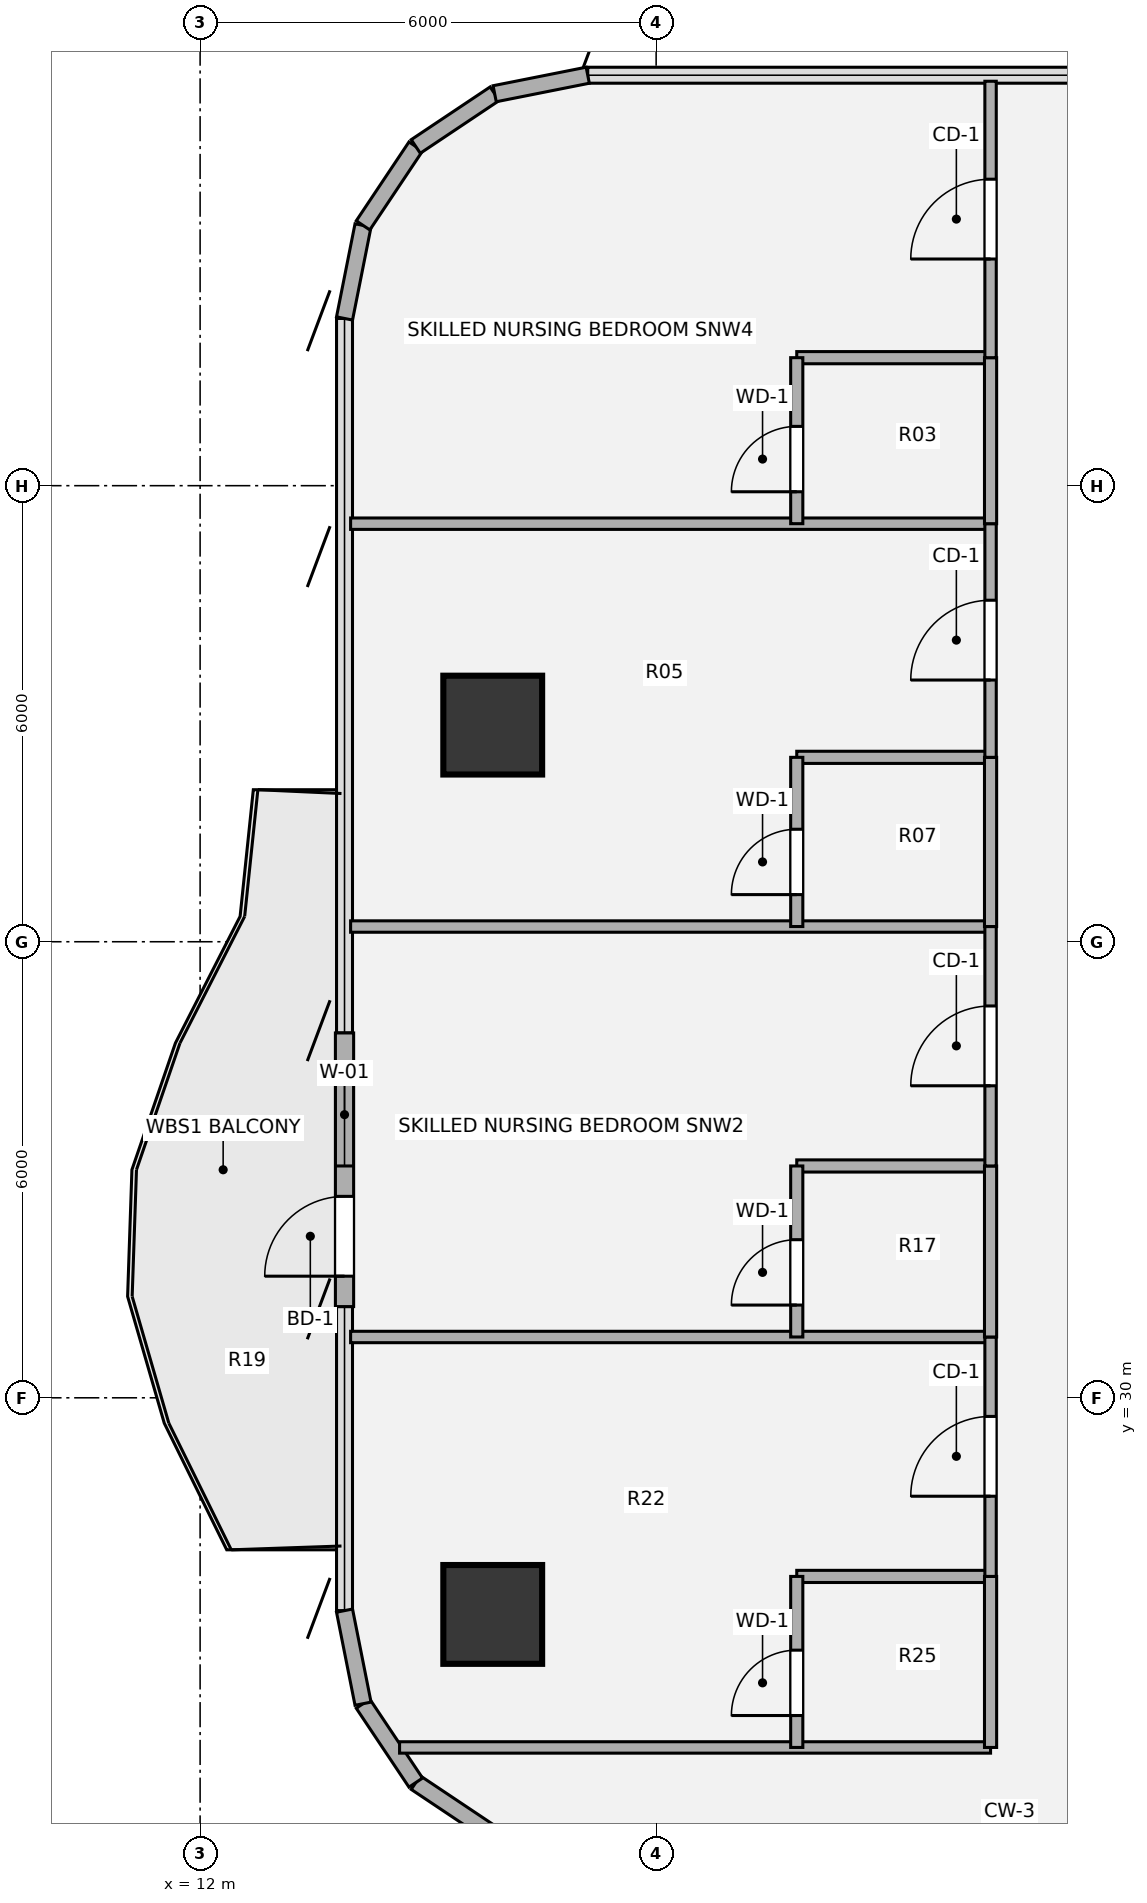
"""IFC4 building model, lengths in metres.
Left out: names, types, materials, properties, quantities, classifications, styles, units other than length and angle.
Written with IfcOpenShell. Run it as: python <this file> out.ifc"""

import sys

from ifc_helpers import new_model, si_unit, direction, frame, frame_2d, origin, origin_2d, place, context, subcontext, project, spatial, rectangle, hollow_circle, extrude, source, transform, mapped, element, fill, save


model = new_model("IFC4")
c1 = context("Model", 3, precision=1e-05, world=origin(), true_north=direction((0.0, 1.0)))
c2 = subcontext(c1, "Body", "Model", "MODEL_VIEW")
j1 = project(units=[si_unit("LENGTHUNIT", "METRE"), si_unit("PLANEANGLEUNIT", "RADIAN")], contexts=[c1])
p1 = place(None, origin())
s1 = spatial("IfcSite", under=j1, at=p1, CompositionType="ELEMENT")
p2 = place(p1, origin())
s2 = spatial("IfcBuilding", under=s1, at=p2, CompositionType="ELEMENT")
p3 = place(p2, frame((0.0, 0.0, 127.62)))
s3 = spatial("IfcBuildingStorey", under=s2, at=p3, CompositionType="ELEMENT", Elevation=127.62)
m1 = source(origin(), c2, "Body", "SweptSolid", [
    extrude(hollow_circle(Radius=0.65, WallThickness=0.045, at=origin_2d()), origin(), (0.0, 0.0, 1.0), 3.78),
])
for number, where, z_axis, x_axis in (
    (1, (15.85, 27.15, 0.0), (0.0, 0.0, 1.0), (1.0, 0.0, 0.0)),
    (2, (15.85, 38.85, 0.0), (0.0, 0.0, 1.0), (1.0, 0.0, 0.0)),
):
    element("IfcColumn", number, at=place(p3, frame(where, z_axis=z_axis, x_axis=x_axis)), inside=s3, PredefinedType="COLUMN", context=c2, shape_type="MappedRepresentation", body=[
        mapped(m1, transform((0.0, 0.0, 0.0), x_axis=(1.0, 0.0, 0.0), y_axis=(0.0, 1.0, 0.0), z_axis=(0.0, 0.0, 1.0), scale=1.0)),
    ])
for number, where, z_axis, x_axis in (
    (3, (15.875, 24.244, 0.0), (0.0, 0.0, 1.0), (-0.831, 0.556, 0.0)),
    (4, (14.837, 24.937, 0.0), (0.0, 0.0, 1.0), (-0.556, 0.831, 0.0)),
    (5, (14.144, 25.975, 0.0), (0.0, 0.0, 1.0), (-0.195, 0.981, 0.0)),
):
    element("IfcWall", number, at=place(p3, frame(where, z_axis=z_axis, x_axis=x_axis)), inside=s3, PredefinedType="SOLIDWALL", context=c2, shape_type="SweptSolid", body=[
        extrude(rectangle(XDim=1.249, YDim=0.215, at=frame_2d((0.624, 0.0))), origin(), (0.0, 0.0, 1.0), 3.53),
    ])
p4 = place(p3, frame((13.9, 31.2, 0.0), z_axis=(0.0, 0.0, 1.0), x_axis=(0.0, 1.0, 0.0)))
e6 = element("IfcWall", 6, at=p4, inside=s3, PredefinedType="SOLIDWALL", context=c2, shape_type="SweptSolid", body=[
    extrude(rectangle(XDim=3.6, YDim=0.24, at=frame_2d((1.8, 0.0))), origin(), (0.0, 0.0, 1.0), 3.53),
])
p5 = place(p4, frame((0.4, 0.0, 0.0)))
e7 = element("IfcOpeningElement", 7, at=p5, cuts=e6, PredefinedType="OPENING", context=c2, shape_type="SweptSolid", body=[
    extrude(rectangle(XDim=1.05, YDim=2.15, at=origin_2d()), frame((0.525, 0.13, 1.075), z_axis=(0.0, -1.0, 0.0), x_axis=(1.0, 0.0, 0.0)), (0.0, 0.0, 1.0), 0.26),
])
p6 = place(p4, frame((1.85, 0.0, 0.85)))
e8 = element("IfcOpeningElement", 8, at=p6, cuts=e6, PredefinedType="OPENING", context=c2, shape_type="SweptSolid", body=[
    extrude(rectangle(XDim=1.35, YDim=1.35, at=origin_2d()), frame((0.675, 0.13, 0.675), z_axis=(0.0, -1.0, 0.0), x_axis=(1.0, 0.0, 0.0)), (0.0, 0.0, 1.0), 0.26),
])
for number, where, z_axis, x_axis in (
    (9, (13.9, 44.2, 0.0), (0.0, 0.0, 1.0), (0.195, 0.981, 0.0)),
    (10, (14.144, 45.425, 0.0), (0.0, 0.0, 1.0), (0.556, 0.831, 0.0)),
    (11, (14.837, 46.463, 0.0), (0.0, 0.0, 1.0), (0.831, 0.556, 0.0)),
    (12, (15.875, 47.156, 0.0), (0.0, 0.0, 1.0), (0.981, 0.195, 0.0)),
):
    element("IfcWall", number, at=place(p3, frame(where, z_axis=z_axis, x_axis=x_axis)), inside=s3, PredefinedType="SOLIDWALL", context=c2, shape_type="SweptSolid", body=[
        extrude(rectangle(XDim=1.249, YDim=0.215, at=frame_2d((0.624, 0.0))), origin(), (0.0, 0.0, 1.0), 3.53),
    ])
p7 = place(p3, frame((14.624, 25.4, 0.0), z_axis=(0.0, 0.0, 1.0), x_axis=(1.0, 0.0, 0.0)))
e13 = element("IfcWall", 13, at=p7, inside=s3, PredefinedType="PARTITIONING", context=c2, shape_type="SweptSolid", body=[
    extrude(rectangle(XDim=7.776, YDim=0.15, at=frame_2d((3.888, 0.0))), origin(), (0.0, 0.0, 1.0), 3.5),
])
p8 = place(p3, frame((19.85, 27.65, 0.0), z_axis=(0.0, 0.0, 1.0), x_axis=(1.0, 0.0, 0.0)))
e14 = element("IfcWall", 14, at=p8, inside=s3, PredefinedType="PLUMBINGWALL", context=c2, shape_type="SweptSolid", body=[
    extrude(rectangle(XDim=2.55, YDim=0.16, at=frame_2d((1.275, 0.0))), origin(), (0.0, 0.0, 1.0), 2.982),
])
p9 = place(p3, frame((13.98, 30.8, 0.0), z_axis=(0.0, 0.0, 1.0), x_axis=(1.0, 0.0, 0.0)))
e15 = element("IfcWall", 15, at=p9, inside=s3, PredefinedType="PARTITIONING", context=c2, shape_type="SweptSolid", body=[
    extrude(rectangle(XDim=8.42, YDim=0.15, at=frame_2d((4.21, 0.0))), origin(), (0.0, 0.0, 1.0), 2.982),
])
p10 = place(p3, frame((19.85, 33.05, 0.0), z_axis=(0.0, 0.0, 1.0), x_axis=(1.0, 0.0, 0.0)))
e16 = element("IfcWall", 16, at=p10, inside=s3, PredefinedType="PLUMBINGWALL", context=c2, shape_type="SweptSolid", body=[
    extrude(rectangle(XDim=2.55, YDim=0.16, at=frame_2d((1.275, 0.0))), origin(), (0.0, 0.0, 1.0), 2.982),
])
p11 = place(p3, frame((13.98, 36.2, 0.0), z_axis=(0.0, 0.0, 1.0), x_axis=(1.0, 0.0, 0.0)))
e17 = element("IfcWall", 17, at=p11, inside=s3, PredefinedType="PARTITIONING", context=c2, shape_type="SweptSolid", body=[
    extrude(rectangle(XDim=8.42, YDim=0.15, at=frame_2d((4.21, 0.0))), origin(), (0.0, 0.0, 1.0), 2.982),
])
p12 = place(p3, frame((19.85, 38.426, 0.0), z_axis=(0.0, 0.0, 1.0), x_axis=(1.0, 0.0, 0.0)))
e18 = element("IfcWall", 18, at=p12, inside=s3, PredefinedType="PLUMBINGWALL", context=c2, shape_type="SweptSolid", body=[
    extrude(rectangle(XDim=2.55, YDim=0.16, at=frame_2d((1.275, 0.0))), origin(), (0.0, 0.0, 1.0), 3.055),
])
p13 = place(p3, frame((13.98, 41.5, 0.0), z_axis=(0.0, 0.0, 1.0), x_axis=(1.0, 0.0, 0.0)))
e19 = element("IfcWall", 19, at=p13, inside=s3, PredefinedType="PARTITIONING", context=c2, shape_type="SweptSolid", body=[
    extrude(rectangle(XDim=8.42, YDim=0.15, at=frame_2d((4.21, 0.0))), origin(), (0.0, 0.0, 1.0), 3.5),
])
p14 = place(p3, frame((19.85, 43.684, 0.0), z_axis=(0.0, 0.0, 1.0), x_axis=(1.0, 0.0, 0.0)))
e20 = element("IfcWall", 20, at=p14, inside=s3, PredefinedType="PLUMBINGWALL", context=c2, shape_type="SweptSolid", body=[
    extrude(rectangle(XDim=2.55, YDim=0.16, at=frame_2d((1.275, 0.0))), origin(), (0.0, 0.0, 1.0), 3.5),
])
p15 = place(p3, frame((19.85, 25.4, 0.0), z_axis=(0.0, 0.0, 1.0), x_axis=(0.0, 1.0, 0.0)))
e21 = element("IfcWall", 21, at=p15, inside=s3, PredefinedType="PLUMBINGWALL", context=c2, shape_type="SweptSolid", body=[
    extrude(rectangle(XDim=2.25, YDim=0.16, at=frame_2d((1.125, 0.0))), origin(), (0.0, 0.0, 1.0), 3.5),
])
p16 = place(p15, frame((0.42, 0.0, 0.0)))
e22 = element("IfcOpeningElement", 22, at=p16, cuts=e21, PredefinedType="OPENING", context=c2, shape_type="SweptSolid", body=[
    extrude(rectangle(XDim=0.86, YDim=2.1, at=origin_2d()), frame((0.43, 0.09, 1.05), z_axis=(0.0, -1.0, 0.0), x_axis=(1.0, 0.0, 0.0)), (0.0, 0.0, 1.0), 0.18),
])
p17 = place(p3, frame((19.85, 30.8, 0.0), z_axis=(0.0, 0.0, 1.0), x_axis=(0.0, 1.0, 0.0)))
e23 = element("IfcWall", 23, at=p17, inside=s3, PredefinedType="PLUMBINGWALL", context=c2, shape_type="SweptSolid", body=[
    extrude(rectangle(XDim=2.25, YDim=0.16, at=frame_2d((1.125, 0.0))), origin(), (0.0, 0.0, 1.0), 3.5),
])
p18 = place(p17, frame((0.42, 0.0, 0.0)))
e24 = element("IfcOpeningElement", 24, at=p18, cuts=e23, PredefinedType="OPENING", context=c2, shape_type="SweptSolid", body=[
    extrude(rectangle(XDim=0.86, YDim=2.1, at=origin_2d()), frame((0.43, 0.09, 1.05), z_axis=(0.0, -1.0, 0.0), x_axis=(1.0, 0.0, 0.0)), (0.0, 0.0, 1.0), 0.18),
])
p19 = place(p3, frame((19.85, 36.2, 0.0), z_axis=(0.0, 0.0, 1.0), x_axis=(0.0, 1.0, 0.0)))
e25 = element("IfcWall", 25, at=p19, inside=s3, PredefinedType="PLUMBINGWALL", context=c2, shape_type="SweptSolid", body=[
    extrude(rectangle(XDim=2.226, YDim=0.16, at=frame_2d((1.113, 0.0))), origin(), (0.0, 0.0, 1.0), 3.5),
])
p20 = place(p19, frame((0.42, 0.0, 0.0)))
e26 = element("IfcOpeningElement", 26, at=p20, cuts=e25, PredefinedType="OPENING", context=c2, shape_type="SweptSolid", body=[
    extrude(rectangle(XDim=0.86, YDim=2.1, at=origin_2d()), frame((0.43, 0.09, 1.05), z_axis=(0.0, -1.0, 0.0), x_axis=(1.0, 0.0, 0.0)), (0.0, 0.0, 1.0), 0.18),
])
p21 = place(p3, frame((19.85, 41.5, 0.0), z_axis=(0.0, 0.0, 1.0), x_axis=(0.0, 1.0, 0.0)))
e27 = element("IfcWall", 27, at=p21, inside=s3, PredefinedType="PLUMBINGWALL", context=c2, shape_type="SweptSolid", body=[
    extrude(rectangle(XDim=2.184, YDim=0.16, at=frame_2d((1.092, 0.0))), origin(), (0.0, 0.0, 1.0), 3.5),
])
p22 = place(p21, frame((0.42, 0.0, 0.0)))
e28 = element("IfcOpeningElement", 28, at=p22, cuts=e27, PredefinedType="OPENING", context=c2, shape_type="SweptSolid", body=[
    extrude(rectangle(XDim=0.86, YDim=2.1, at=origin_2d()), frame((0.43, 0.09, 1.05), z_axis=(0.0, -1.0, 0.0), x_axis=(1.0, 0.0, 0.0)), (0.0, 0.0, 1.0), 0.18),
])
p23 = place(p3, frame((22.4, 25.4, 0.0), z_axis=(0.0, 0.0, 1.0), x_axis=(0.0, 1.0, 0.0)))
e29 = element("IfcWall", 29, at=p23, inside=s3, PredefinedType="PLUMBINGWALL", context=c2, shape_type="SweptSolid", body=[
    extrude(rectangle(XDim=2.25, YDim=0.16, at=frame_2d((1.125, 0.0))), origin(), (0.0, 0.0, 1.0), 3.5),
])
p24 = place(p3, frame((22.4, 27.65, 0.0), z_axis=(0.0, 0.0, 1.0), x_axis=(0.0, 1.0, 0.0)))
e30 = element("IfcWall", 30, at=p24, inside=s3, PredefinedType="PARTITIONING", context=c2, shape_type="SweptSolid", body=[
    extrude(rectangle(XDim=3.15, YDim=0.15, at=frame_2d((1.575, 0.0))), origin(), (0.0, 0.0, 1.0), 3.5),
])
p25 = place(p24, frame((1.055, 0.0, 0.0)))
e31 = element("IfcOpeningElement", 31, at=p25, cuts=e30, PredefinedType="OPENING", context=c2, shape_type="SweptSolid", body=[
    extrude(rectangle(XDim=1.05, YDim=2.1, at=origin_2d()), frame((0.525, 0.085, 1.05), z_axis=(0.0, -1.0, 0.0), x_axis=(1.0, 0.0, 0.0)), (0.0, 0.0, 1.0), 0.17),
])
p26 = place(p3, frame((22.4, 30.8, 0.0), z_axis=(0.0, 0.0, 1.0), x_axis=(0.0, 1.0, 0.0)))
e32 = element("IfcWall", 32, at=p26, inside=s3, PredefinedType="PLUMBINGWALL", context=c2, shape_type="SweptSolid", body=[
    extrude(rectangle(XDim=2.25, YDim=0.16, at=frame_2d((1.125, 0.0))), origin(), (0.0, 0.0, 1.0), 3.5),
])
p27 = place(p3, frame((22.4, 33.05, 0.0), z_axis=(0.0, 0.0, 1.0), x_axis=(0.0, 1.0, 0.0)))
e33 = element("IfcWall", 33, at=p27, inside=s3, PredefinedType="PARTITIONING", context=c2, shape_type="SweptSolid", body=[
    extrude(rectangle(XDim=3.15, YDim=0.15, at=frame_2d((1.575, 0.0))), origin(), (0.0, 0.0, 1.0), 3.5),
])
p28 = place(p27, frame((1.055, 0.0, 0.0)))
e34 = element("IfcOpeningElement", 34, at=p28, cuts=e33, PredefinedType="OPENING", context=c2, shape_type="SweptSolid", body=[
    extrude(rectangle(XDim=1.05, YDim=2.1, at=origin_2d()), frame((0.525, 0.085, 1.05), z_axis=(0.0, -1.0, 0.0), x_axis=(1.0, 0.0, 0.0)), (0.0, 0.0, 1.0), 0.17),
])
p29 = place(p3, frame((22.4, 36.2, 0.0), z_axis=(0.0, 0.0, 1.0), x_axis=(0.0, 1.0, 0.0)))
e35 = element("IfcWall", 35, at=p29, inside=s3, PredefinedType="PLUMBINGWALL", context=c2, shape_type="SweptSolid", body=[
    extrude(rectangle(XDim=2.226, YDim=0.16, at=frame_2d((1.113, 0.0))), origin(), (0.0, 0.0, 1.0), 3.5),
])
p30 = place(p3, frame((22.4, 38.426, 0.0), z_axis=(0.0, 0.0, 1.0), x_axis=(0.0, 1.0, 0.0)))
e36 = element("IfcWall", 36, at=p30, inside=s3, PredefinedType="PARTITIONING", context=c2, shape_type="SweptSolid", body=[
    extrude(rectangle(XDim=3.074, YDim=0.15, at=frame_2d((1.537, 0.0))), origin(), (0.0, 0.0, 1.0), 3.5),
])
p31 = place(p30, frame((1.017, 0.0, 0.0)))
e37 = element("IfcOpeningElement", 37, at=p31, cuts=e36, PredefinedType="OPENING", context=c2, shape_type="SweptSolid", body=[
    extrude(rectangle(XDim=1.05, YDim=2.1, at=origin_2d()), frame((0.525, 0.085, 1.05), z_axis=(0.0, -1.0, 0.0), x_axis=(1.0, 0.0, 0.0)), (0.0, 0.0, 1.0), 0.17),
])
p32 = place(p3, frame((22.4, 41.5, 0.0), z_axis=(0.0, 0.0, 1.0), x_axis=(0.0, 1.0, 0.0)))
e38 = element("IfcWall", 38, at=p32, inside=s3, PredefinedType="PLUMBINGWALL", context=c2, shape_type="SweptSolid", body=[
    extrude(rectangle(XDim=2.184, YDim=0.16, at=frame_2d((1.092, 0.0))), origin(), (0.0, 0.0, 1.0), 3.5),
])
p33 = place(p3, frame((22.4, 43.684, 0.0), z_axis=(0.0, 0.0, 1.0), x_axis=(0.0, 1.0, 0.0)))
e39 = element("IfcWall", 39, at=p33, inside=s3, PredefinedType="PARTITIONING", context=c2, shape_type="SweptSolid", body=[
    extrude(rectangle(XDim=3.637, YDim=0.15, at=frame_2d((1.818, 0.0))), origin(), (0.0, 0.0, 1.0), 3.5),
])
p34 = place(p33, frame((1.298, 0.0, 0.0)))
e40 = element("IfcOpeningElement", 40, at=p34, cuts=e39, PredefinedType="OPENING", context=c2, shape_type="SweptSolid", body=[
    extrude(rectangle(XDim=1.05, YDim=2.1, at=origin_2d()), frame((0.525, 0.085, 1.05), z_axis=(0.0, -1.0, 0.0), x_axis=(1.0, 0.0, 0.0)), (0.0, 0.0, 1.0), 0.17),
])
m2 = source(origin(), c2, "Body", "SweptSolid", [
    extrude(rectangle(XDim=1.05, YDim=2.15, at=origin_2d()), frame((0.525, 0.025, 1.075), z_axis=(0.0, -1.0, 0.0), x_axis=(1.0, 0.0, 0.0)), (0.0, 0.0, 1.0), 0.05),
])
p35 = place(p5, origin())
e41 = element("IfcDoor", 41, at=p35, inside=s3, OperationType="SINGLE_SWING_LEFT", PredefinedType="DOOR", context=c2, shape_type="MappedRepresentation", body=[
    mapped(m2, transform((0.0, 0.0, 0.0), x_axis=(1.0, 0.0, 0.0), y_axis=(0.0, 1.0, 0.0), z_axis=(0.0, 0.0, 1.0), scale=1.0)),
])
fill(e7, e41)
m3 = source(origin(), c2, "Body", "SweptSolid", [
    extrude(rectangle(XDim=1.35, YDim=1.35, at=origin_2d()), frame((0.675, 0.03, 0.675), z_axis=(0.0, -1.0, 0.0), x_axis=(1.0, 0.0, 0.0)), (0.0, 0.0, 1.0), 0.06),
])
p36 = place(p6, origin())
e42 = element("IfcWindow", 42, at=p36, inside=s3, PartitioningType="SINGLE_PANEL", PredefinedType="WINDOW", context=c2, shape_type="MappedRepresentation", body=[
    mapped(m3, transform((0.0, 0.0, 0.0), x_axis=(1.0, 0.0, 0.0), y_axis=(0.0, 1.0, 0.0), z_axis=(0.0, 0.0, 1.0), scale=1.0)),
])
fill(e8, e42)
m4 = source(origin(), c2, "Body", "SweptSolid", [
    extrude(rectangle(XDim=0.86, YDim=2.1, at=origin_2d()), frame((0.43, 0.025, 1.05), z_axis=(0.0, -1.0, 0.0), x_axis=(1.0, 0.0, 0.0)), (0.0, 0.0, 1.0), 0.05),
])
p37 = place(p16, origin())
e43 = element("IfcDoor", 43, at=p37, inside=s3, OperationType="SINGLE_SWING_LEFT", PredefinedType="DOOR", context=c2, shape_type="MappedRepresentation", body=[
    mapped(m4, transform((0.0, 0.0, 0.0), x_axis=(1.0, 0.0, 0.0), y_axis=(0.0, 1.0, 0.0), z_axis=(0.0, 0.0, 1.0), scale=1.0)),
])
fill(e22, e43)
p38 = place(p18, origin())
e44 = element("IfcDoor", 44, at=p38, inside=s3, OperationType="SINGLE_SWING_LEFT", PredefinedType="DOOR", context=c2, shape_type="MappedRepresentation", body=[
    mapped(m4, transform((0.0, 0.0, 0.0), x_axis=(1.0, 0.0, 0.0), y_axis=(0.0, 1.0, 0.0), z_axis=(0.0, 0.0, 1.0), scale=1.0)),
])
fill(e24, e44)
p39 = place(p20, origin())
e45 = element("IfcDoor", 45, at=p39, inside=s3, OperationType="SINGLE_SWING_LEFT", PredefinedType="DOOR", context=c2, shape_type="MappedRepresentation", body=[
    mapped(m4, transform((0.0, 0.0, 0.0), x_axis=(1.0, 0.0, 0.0), y_axis=(0.0, 1.0, 0.0), z_axis=(0.0, 0.0, 1.0), scale=1.0)),
])
fill(e26, e45)
p40 = place(p22, origin())
e46 = element("IfcDoor", 46, at=p40, inside=s3, OperationType="SINGLE_SWING_LEFT", PredefinedType="DOOR", context=c2, shape_type="MappedRepresentation", body=[
    mapped(m4, transform((0.0, 0.0, 0.0), x_axis=(1.0, 0.0, 0.0), y_axis=(0.0, 1.0, 0.0), z_axis=(0.0, 0.0, 1.0), scale=1.0)),
])
fill(e28, e46)
m5 = source(origin(), c2, "Body", "SweptSolid", [
    extrude(rectangle(XDim=1.05, YDim=2.1, at=origin_2d()), frame((0.525, 0.025, 1.05), z_axis=(0.0, -1.0, 0.0), x_axis=(1.0, 0.0, 0.0)), (0.0, 0.0, 1.0), 0.05),
])
p41 = place(p25, origin())
e47 = element("IfcDoor", 47, at=p41, inside=s3, OperationType="SINGLE_SWING_LEFT", PredefinedType="DOOR", context=c2, shape_type="MappedRepresentation", body=[
    mapped(m5, transform((0.0, 0.0, 0.0), x_axis=(1.0, 0.0, 0.0), y_axis=(0.0, 1.0, 0.0), z_axis=(0.0, 0.0, 1.0), scale=1.0)),
])
fill(e31, e47)
p42 = place(p28, origin())
e48 = element("IfcDoor", 48, at=p42, inside=s3, OperationType="SINGLE_SWING_LEFT", PredefinedType="DOOR", context=c2, shape_type="MappedRepresentation", body=[
    mapped(m5, transform((0.0, 0.0, 0.0), x_axis=(1.0, 0.0, 0.0), y_axis=(0.0, 1.0, 0.0), z_axis=(0.0, 0.0, 1.0), scale=1.0)),
])
fill(e34, e48)
p43 = place(p31, origin())
e49 = element("IfcDoor", 49, at=p43, inside=s3, OperationType="SINGLE_SWING_LEFT", PredefinedType="DOOR", context=c2, shape_type="MappedRepresentation", body=[
    mapped(m5, transform((0.0, 0.0, 0.0), x_axis=(1.0, 0.0, 0.0), y_axis=(0.0, 1.0, 0.0), z_axis=(0.0, 0.0, 1.0), scale=1.0)),
])
fill(e37, e49)
p44 = place(p34, origin())
e50 = element("IfcDoor", 50, at=p44, inside=s3, OperationType="SINGLE_SWING_LEFT", PredefinedType="DOOR", context=c2, shape_type="MappedRepresentation", body=[
    mapped(m5, transform((0.0, 0.0, 0.0), x_axis=(1.0, 0.0, 0.0), y_axis=(0.0, 1.0, 0.0), z_axis=(0.0, 0.0, 1.0), scale=1.0)),
])
fill(e40, e50)
save(model, sys.argv[1])
